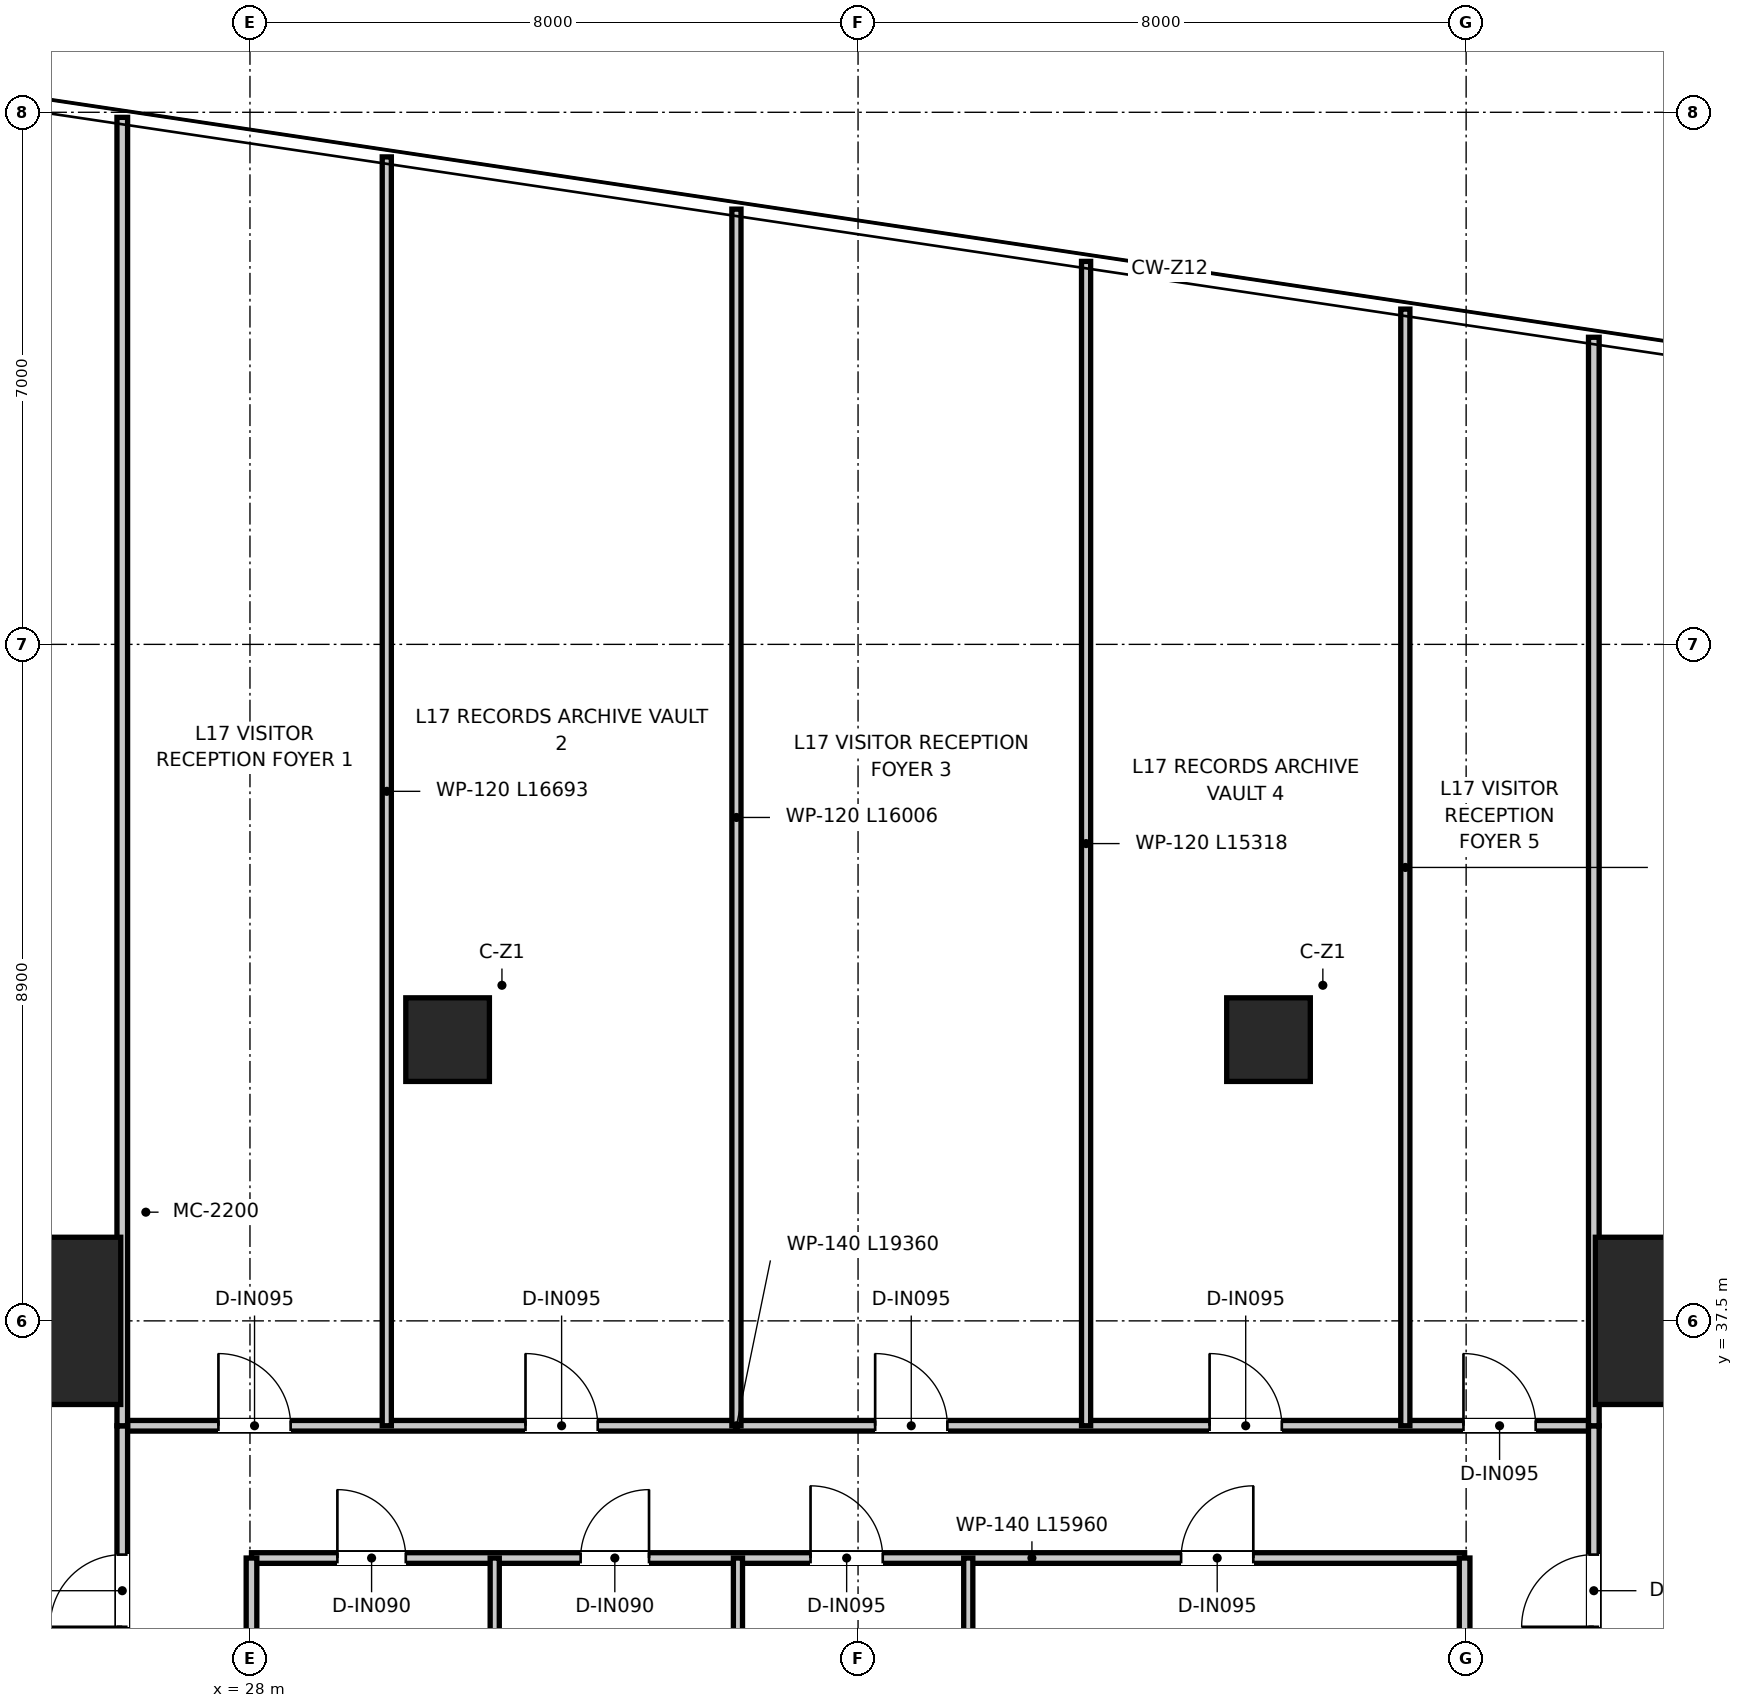
"""IFC4 building model, lengths in metres.
Left out: names, types, materials, properties, quantities, classifications, styles, units other than length and angle.
Written with IfcOpenShell. Run it as: python <this file> out.ifc"""

import sys

from ifc_helpers import new_model, si_unit, direction, frame, frame_2d, origin, origin_2d, place, context, subcontext, project, spatial, rectangle, extrude, source, transform, mapped, element, fill, save


model = new_model("IFC4")
c1 = context("Model", 3, precision=1e-05, world=origin(), true_north=direction((0.0, 1.0)))
c2 = subcontext(c1, "Body", "Model", "MODEL_VIEW")
j1 = project(units=[si_unit("LENGTHUNIT", "METRE"), si_unit("PLANEANGLEUNIT", "RADIAN")], contexts=[c1])
p1 = place(None, origin())
s1 = spatial("IfcSite", under=j1, at=p1, CompositionType="ELEMENT")
p2 = place(p1, origin())
s2 = spatial("IfcBuilding", under=s1, at=p2, CompositionType="ELEMENT")
p3 = place(p2, frame((0.0, 0.0, 72.4)))
s3 = spatial("IfcBuildingStorey", under=s2, at=p3, CompositionType="ELEMENT", Elevation=72.4)
m1 = source(origin(), c2, "Body", "SweptSolid", [
    extrude(rectangle(XDim=2.2, YDim=2.2, at=origin_2d()), origin(), (0.0, 0.0, 1.0), 3.95),
])
for number, where, z_axis, x_axis in (
    (1, (46.8, 37.5, 0.0), (0.0, 0.0, 1.0), (1.0, 0.0, 0.0)),
    (2, (25.2, 37.5, 0.0), (0.0, 0.0, 1.0), (1.0, 0.0, 0.0)),
):
    element("IfcColumn", number, at=place(p3, frame(where, z_axis=z_axis, x_axis=x_axis)), inside=s3, PredefinedType="USERDEFINED", context=c2, shape_type="MappedRepresentation", body=[
        mapped(m1, transform((0.0, 0.0, 0.0), x_axis=(1.0, 0.0, 0.0), y_axis=(0.0, 1.0, 0.0), z_axis=(0.0, 0.0, 1.0), scale=1.0)),
    ])
m2 = source(origin(), c2, "Body", "SweptSolid", [
    extrude(rectangle(XDim=1.1, YDim=1.1, at=origin_2d()), origin(), (0.0, 0.0, 1.0), 3.95),
])
for number, where, z_axis, x_axis in (
    (3, (30.6, 41.2, 0.0), (0.0, 0.0, 1.0), (1.0, 0.0, 0.0)),
    (4, (41.4, 41.2, 0.0), (0.0, 0.0, 1.0), (1.0, 0.0, 0.0)),
):
    element("IfcColumn", number, at=place(p3, frame(where, z_axis=z_axis, x_axis=x_axis)), inside=s3, PredefinedType="COLUMN", context=c2, shape_type="MappedRepresentation", body=[
        mapped(m2, transform((0.0, 0.0, 0.0), x_axis=(1.0, 0.0, 0.0), y_axis=(0.0, 1.0, 0.0), z_axis=(0.0, 0.0, 1.0), scale=1.0)),
    ])
p4 = place(p3, frame((28.02, 34.38, 0.0), z_axis=(0.0, 0.0, 1.0), x_axis=(1.0, 0.0, 0.0)))
e5 = element("IfcWall", 5, at=p4, inside=s3, PredefinedType="PARTITIONING", context=c2, shape_type="SweptSolid", body=[
    extrude(rectangle(XDim=15.96, YDim=0.14, at=frame_2d((7.98, 0.0))), origin(), (0.0, 0.0, 1.0), 3.08),
])
p5 = place(p4, frame((1.13, 0.0, 0.0)))
e6 = element("IfcOpeningElement", 6, at=p5, cuts=e5, PredefinedType="OPENING", context=c2, shape_type="SweptSolid", body=[
    extrude(rectangle(XDim=0.9, YDim=2.1, at=frame_2d((0.45, 1.05))), frame((0.0, 0.08, 0.0), z_axis=(0.0, -1.0, 0.0), x_axis=(1.0, 0.0, 0.0)), (0.0, 0.0, 1.0), 0.16),
])
p6 = place(p4, frame((4.33, 0.0, 0.0)))
e7 = element("IfcOpeningElement", 7, at=p6, cuts=e5, PredefinedType="OPENING", context=c2, shape_type="SweptSolid", body=[
    extrude(rectangle(XDim=0.9, YDim=2.1, at=frame_2d((0.45, 1.05))), frame((0.0, 0.08, 0.0), z_axis=(0.0, -1.0, 0.0), x_axis=(1.0, 0.0, 0.0)), (0.0, 0.0, 1.0), 0.16),
])
p7 = place(p4, frame((7.355, 0.0, 0.0)))
e8 = element("IfcOpeningElement", 8, at=p7, cuts=e5, PredefinedType="OPENING", context=c2, shape_type="SweptSolid", body=[
    extrude(rectangle(XDim=0.95, YDim=2.1, at=frame_2d((0.475, 1.05))), frame((0.0, 0.08, 0.0), z_axis=(0.0, -1.0, 0.0), x_axis=(1.0, 0.0, 0.0)), (0.0, 0.0, 1.0), 0.16),
])
p8 = place(p4, frame((12.23, 0.0, 0.0)))
e9 = element("IfcOpeningElement", 9, at=p8, cuts=e5, PredefinedType="OPENING", context=c2, shape_type="SweptSolid", body=[
    extrude(rectangle(XDim=0.95, YDim=2.1, at=frame_2d((0.475, 1.05))), frame((0.0, 0.08, 0.0), z_axis=(0.0, -1.0, 0.0), x_axis=(1.0, 0.0, 0.0)), (0.0, 0.0, 1.0), 0.16),
])
for number, where, z_axis, x_axis in (
    (10, (28.02, 28.64, 0.0), (0.0, 0.0, 1.0), (0.0, 1.0, 0.0)),
    (11, (43.98, 28.64, 0.0), (0.0, 0.0, 1.0), (0.0, 1.0, 0.0)),
):
    element("IfcWall", number, at=place(p3, frame(where, z_axis=z_axis, x_axis=x_axis)), inside=s3, PredefinedType="PARTITIONING", context=c2, shape_type="SweptSolid", body=[
        extrude(rectangle(XDim=5.74, YDim=0.14, at=frame_2d((2.87, 0.0))), origin(), (0.0, 0.0, 1.0), 3.22),
    ])
for number, where, z_axis, x_axis in (
    (12, (31.22, 30.74, 0.0), (0.0, 0.0, 1.0), (0.0, 1.0, 0.0)),
    (13, (34.42, 30.74, 0.0), (0.0, 0.0, 1.0), (0.0, 1.0, 0.0)),
    (14, (37.45, 30.74, 0.0), (0.0, 0.0, 1.0), (0.0, 1.0, 0.0)),
):
    element("IfcWall", number, at=place(p3, frame(where, z_axis=z_axis, x_axis=x_axis)), inside=s3, PredefinedType="PARTITIONING", context=c2, shape_type="SweptSolid", body=[
        extrude(rectangle(XDim=3.64, YDim=0.12, at=frame_2d((1.82, 0.0))), origin(), (0.0, 0.0, 1.0), 3.12),
    ])
p9 = place(p3, frame((26.32, 36.12, 0.0), z_axis=(0.0, 0.0, 1.0), x_axis=(1.0, 0.0, 0.0)))
e15 = element("IfcWall", 15, at=p9, inside=s3, PredefinedType="PARTITIONING", context=c2, shape_type="SweptSolid", body=[
    extrude(rectangle(XDim=19.36, YDim=0.14, at=frame_2d((9.68, 0.0))), origin(), (0.0, 0.0, 1.0), 3.08),
])
p10 = place(p9, frame((1.265, 0.0, 0.0)))
e16 = element("IfcOpeningElement", 16, at=p10, cuts=e15, PredefinedType="OPENING", context=c2, shape_type="SweptSolid", body=[
    extrude(rectangle(XDim=0.95, YDim=2.1, at=frame_2d((0.475, 1.05))), frame((0.0, 0.08, 0.0), z_axis=(0.0, -1.0, 0.0), x_axis=(1.0, 0.0, 0.0)), (0.0, 0.0, 1.0), 0.16),
])
p11 = place(p9, frame((5.305, 0.0, 0.0)))
e17 = element("IfcOpeningElement", 17, at=p11, cuts=e15, PredefinedType="OPENING", context=c2, shape_type="SweptSolid", body=[
    extrude(rectangle(XDim=0.95, YDim=2.1, at=frame_2d((0.475, 1.05))), frame((0.0, 0.08, 0.0), z_axis=(0.0, -1.0, 0.0), x_axis=(1.0, 0.0, 0.0)), (0.0, 0.0, 1.0), 0.16),
])
p12 = place(p9, frame((9.905, 0.0, 0.0)))
e18 = element("IfcOpeningElement", 18, at=p12, cuts=e15, PredefinedType="OPENING", context=c2, shape_type="SweptSolid", body=[
    extrude(rectangle(XDim=0.95, YDim=2.1, at=frame_2d((0.475, 1.05))), frame((0.0, 0.08, 0.0), z_axis=(0.0, -1.0, 0.0), x_axis=(1.0, 0.0, 0.0)), (0.0, 0.0, 1.0), 0.16),
])
p13 = place(p9, frame((14.305, 0.0, 0.0)))
e19 = element("IfcOpeningElement", 19, at=p13, cuts=e15, PredefinedType="OPENING", context=c2, shape_type="SweptSolid", body=[
    extrude(rectangle(XDim=0.95, YDim=2.1, at=frame_2d((0.475, 1.05))), frame((0.0, 0.08, 0.0), z_axis=(0.0, -1.0, 0.0), x_axis=(1.0, 0.0, 0.0)), (0.0, 0.0, 1.0), 0.16),
])
p14 = place(p9, frame((17.645, 0.0, 0.0)))
e20 = element("IfcOpeningElement", 20, at=p14, cuts=e15, PredefinedType="OPENING", context=c2, shape_type="SweptSolid", body=[
    extrude(rectangle(XDim=0.95, YDim=2.1, at=frame_2d((0.475, 1.05))), frame((0.0, 0.08, 0.0), z_axis=(0.0, -1.0, 0.0), x_axis=(1.0, 0.0, 0.0)), (0.0, 0.0, 1.0), 0.16),
])
p15 = place(p3, frame((26.32, 10.5, 0.0), z_axis=(0.0, 0.0, 1.0), x_axis=(0.0, 1.0, 0.0)))
e21 = element("IfcWall", 21, at=p15, inside=s3, PredefinedType="PARTITIONING", context=c2, shape_type="SweptSolid", body=[
    extrude(rectangle(XDim=25.62, YDim=0.14, at=frame_2d((12.81, 0.0))), origin(), (0.0, 0.0, 1.0), 2.97),
])
p16 = place(p15, frame((7.775, 0.0, 0.0)))
e22 = element("IfcOpeningElement", 22, at=p16, cuts=e21, PredefinedType="OPENING", context=c2, shape_type="SweptSolid", body=[
    extrude(rectangle(XDim=0.95, YDim=2.1, at=frame_2d((0.475, 1.05))), frame((0.0, 0.08, 0.0), z_axis=(0.0, -1.0, 0.0), x_axis=(1.0, 0.0, 0.0)), (0.0, 0.0, 1.0), 0.16),
])
p17 = place(p15, frame((11.275, 0.0, 0.0)))
e23 = element("IfcOpeningElement", 23, at=p17, cuts=e21, PredefinedType="OPENING", context=c2, shape_type="SweptSolid", body=[
    extrude(rectangle(XDim=0.95, YDim=2.1, at=frame_2d((0.475, 1.05))), frame((0.0, 0.08, 0.0), z_axis=(0.0, -1.0, 0.0), x_axis=(1.0, 0.0, 0.0)), (0.0, 0.0, 1.0), 0.16),
])
p18 = place(p15, frame((15.775, 0.0, 0.0)))
e24 = element("IfcOpeningElement", 24, at=p18, cuts=e21, PredefinedType="OPENING", context=c2, shape_type="SweptSolid", body=[
    extrude(rectangle(XDim=0.95, YDim=2.1, at=frame_2d((0.475, 1.05))), frame((0.0, 0.08, 0.0), z_axis=(0.0, -1.0, 0.0), x_axis=(1.0, 0.0, 0.0)), (0.0, 0.0, 1.0), 0.16),
])
p19 = place(p15, frame((20.125, 0.0, 0.0)))
e25 = element("IfcOpeningElement", 25, at=p19, cuts=e21, PredefinedType="OPENING", context=c2, shape_type="SweptSolid", body=[
    extrude(rectangle(XDim=0.95, YDim=2.1, at=frame_2d((0.475, 1.05))), frame((0.0, 0.08, 0.0), z_axis=(0.0, -1.0, 0.0), x_axis=(1.0, 0.0, 0.0)), (0.0, 0.0, 1.0), 0.16),
])
p20 = place(p15, frame((22.975, 0.0, 0.0)))
e26 = element("IfcOpeningElement", 26, at=p20, cuts=e21, PredefinedType="OPENING", context=c2, shape_type="SweptSolid", body=[
    extrude(rectangle(XDim=0.95, YDim=2.1, at=frame_2d((0.475, 1.05))), frame((0.0, 0.08, 0.0), z_axis=(0.0, -1.0, 0.0), x_axis=(1.0, 0.0, 0.0)), (0.0, 0.0, 1.0), 0.16),
])
p21 = place(p3, frame((45.68, 10.5, 0.0), z_axis=(0.0, 0.0, 1.0), x_axis=(0.0, 1.0, 0.0)))
e27 = element("IfcWall", 27, at=p21, inside=s3, PredefinedType="PARTITIONING", context=c2, shape_type="SweptSolid", body=[
    extrude(rectangle(XDim=25.62, YDim=0.14, at=frame_2d((12.81, 0.0))), origin(), (0.0, 0.0, 1.0), 2.97),
])
p22 = place(p21, frame((7.775, 0.0, 0.0)))
e28 = element("IfcOpeningElement", 28, at=p22, cuts=e27, PredefinedType="OPENING", context=c2, shape_type="SweptSolid", body=[
    extrude(rectangle(XDim=0.95, YDim=2.1, at=frame_2d((0.475, 1.05))), frame((0.0, 0.08, 0.0), z_axis=(0.0, -1.0, 0.0), x_axis=(1.0, 0.0, 0.0)), (0.0, 0.0, 1.0), 0.16),
])
p23 = place(p21, frame((11.275, 0.0, 0.0)))
e29 = element("IfcOpeningElement", 29, at=p23, cuts=e27, PredefinedType="OPENING", context=c2, shape_type="SweptSolid", body=[
    extrude(rectangle(XDim=0.95, YDim=2.1, at=frame_2d((0.475, 1.05))), frame((0.0, 0.08, 0.0), z_axis=(0.0, -1.0, 0.0), x_axis=(1.0, 0.0, 0.0)), (0.0, 0.0, 1.0), 0.16),
])
p24 = place(p21, frame((15.775, 0.0, 0.0)))
e30 = element("IfcOpeningElement", 30, at=p24, cuts=e27, PredefinedType="OPENING", context=c2, shape_type="SweptSolid", body=[
    extrude(rectangle(XDim=0.95, YDim=2.1, at=frame_2d((0.475, 1.05))), frame((0.0, 0.08, 0.0), z_axis=(0.0, -1.0, 0.0), x_axis=(1.0, 0.0, 0.0)), (0.0, 0.0, 1.0), 0.16),
])
p25 = place(p21, frame((20.125, 0.0, 0.0)))
e31 = element("IfcOpeningElement", 31, at=p25, cuts=e27, PredefinedType="OPENING", context=c2, shape_type="SweptSolid", body=[
    extrude(rectangle(XDim=0.95, YDim=2.1, at=frame_2d((0.475, 1.05))), frame((0.0, 0.08, 0.0), z_axis=(0.0, -1.0, 0.0), x_axis=(1.0, 0.0, 0.0)), (0.0, 0.0, 1.0), 0.16),
])
p26 = place(p21, frame((22.975, 0.0, 0.0)))
e32 = element("IfcOpeningElement", 32, at=p26, cuts=e27, PredefinedType="OPENING", context=c2, shape_type="SweptSolid", body=[
    extrude(rectangle(XDim=0.95, YDim=2.1, at=frame_2d((0.475, 1.05))), frame((0.0, 0.08, 0.0), z_axis=(0.0, -1.0, 0.0), x_axis=(1.0, 0.0, 0.0)), (0.0, 0.0, 1.0), 0.16),
])
p27 = place(p3, frame((26.32, 36.12, 0.0), z_axis=(0.0, 0.0, 1.0), x_axis=(0.0, 1.0, 0.0)))
e33 = element("IfcWall", 33, at=p27, inside=s3, PredefinedType="PARTITIONING", context=c2, shape_type="SweptSolid", body=[
    extrude(rectangle(XDim=17.213, YDim=0.14, at=frame_2d((8.606, 0.0))), origin(), (0.0, 0.0, 1.0), 2.97),
])
p28 = place(p3, frame((45.68, 36.12, 0.0), z_axis=(0.0, 0.0, 1.0), x_axis=(0.0, 1.0, 0.0)))
e34 = element("IfcWall", 34, at=p28, inside=s3, PredefinedType="PARTITIONING", context=c2, shape_type="SweptSolid", body=[
    extrude(rectangle(XDim=14.32, YDim=0.14, at=frame_2d((7.16, 0.0))), origin(), (0.0, 0.0, 1.0), 2.97),
])
p29 = place(p3, frame((29.8, 36.12, 0.0), z_axis=(0.0, 0.0, 1.0), x_axis=(0.0, 1.0, 0.0)))
e35 = element("IfcWall", 35, at=p29, inside=s3, PredefinedType="PARTITIONING", context=c2, shape_type="SweptSolid", body=[
    extrude(rectangle(XDim=16.693, YDim=0.12, at=frame_2d((8.347, 0.0))), origin(), (0.0, 0.0, 1.0), 2.97),
])
p30 = place(p3, frame((34.4, 36.12, 0.0), z_axis=(0.0, 0.0, 1.0), x_axis=(0.0, 1.0, 0.0)))
e36 = element("IfcWall", 36, at=p30, inside=s3, PredefinedType="PARTITIONING", context=c2, shape_type="SweptSolid", body=[
    extrude(rectangle(XDim=16.006, YDim=0.12, at=frame_2d((8.003, 0.0))), origin(), (0.0, 0.0, 1.0), 2.97),
])
p31 = place(p3, frame((39.0, 36.12, 0.0), z_axis=(0.0, 0.0, 1.0), x_axis=(0.0, 1.0, 0.0)))
e37 = element("IfcWall", 37, at=p31, inside=s3, PredefinedType="PARTITIONING", context=c2, shape_type="SweptSolid", body=[
    extrude(rectangle(XDim=15.318, YDim=0.12, at=frame_2d((7.659, 0.0))), origin(), (0.0, 0.0, 1.0), 2.97),
])
p32 = place(p3, frame((43.2, 36.12, 0.0), z_axis=(0.0, 0.0, 1.0), x_axis=(0.0, 1.0, 0.0)))
e38 = element("IfcWall", 38, at=p32, inside=s3, PredefinedType="PARTITIONING", context=c2, shape_type="SweptSolid", body=[
    extrude(rectangle(XDim=14.69, YDim=0.12, at=frame_2d((7.345, 0.0))), origin(), (0.0, 0.0, 1.0), 2.97),
])
p33 = place(p5, origin())
e39 = element("IfcDoor", 39, at=p33, inside=s3, OperationType="SINGLE_SWING_LEFT", PredefinedType="DOOR", context=c2, shape_type="SweptSolid", body=[
    extrude(rectangle(XDim=0.9, YDim=2.1, at=frame_2d((0.45, 1.05))), frame((0.0, 0.025, 0.0), z_axis=(0.0, -1.0, 0.0), x_axis=(1.0, 0.0, 0.0)), (0.0, 0.0, 1.0), 0.05),
])
fill(e6, e39)
p34 = place(p6, origin())
e40 = element("IfcDoor", 40, at=p34, inside=s3, OperationType="SINGLE_SWING_RIGHT", PredefinedType="DOOR", context=c2, shape_type="SweptSolid", body=[
    extrude(rectangle(XDim=0.9, YDim=2.1, at=frame_2d((0.45, 1.05))), frame((0.0, 0.025, 0.0), z_axis=(0.0, -1.0, 0.0), x_axis=(1.0, 0.0, 0.0)), (0.0, 0.0, 1.0), 0.05),
])
fill(e7, e40)
p35 = place(p7, origin())
e41 = element("IfcDoor", 41, at=p35, inside=s3, OperationType="SINGLE_SWING_LEFT", PredefinedType="DOOR", context=c2, shape_type="SweptSolid", body=[
    extrude(rectangle(XDim=0.95, YDim=2.1, at=frame_2d((0.475, 1.05))), frame((0.0, 0.025, 0.0), z_axis=(0.0, -1.0, 0.0), x_axis=(1.0, 0.0, 0.0)), (0.0, 0.0, 1.0), 0.05),
])
fill(e8, e41)
p36 = place(p8, origin())
e42 = element("IfcDoor", 42, at=p36, inside=s3, OperationType="SINGLE_SWING_RIGHT", PredefinedType="DOOR", context=c2, shape_type="SweptSolid", body=[
    extrude(rectangle(XDim=0.95, YDim=2.1, at=frame_2d((0.475, 1.05))), frame((0.0, 0.025, 0.0), z_axis=(0.0, -1.0, 0.0), x_axis=(1.0, 0.0, 0.0)), (0.0, 0.0, 1.0), 0.05),
])
fill(e9, e42)
p37 = place(p10, origin())
e43 = element("IfcDoor", 43, at=p37, inside=s3, OperationType="SINGLE_SWING_LEFT", PredefinedType="DOOR", context=c2, shape_type="SweptSolid", body=[
    extrude(rectangle(XDim=0.95, YDim=2.1, at=frame_2d((0.475, 1.05))), frame((0.0, 0.025, 0.0), z_axis=(0.0, -1.0, 0.0), x_axis=(1.0, 0.0, 0.0)), (0.0, 0.0, 1.0), 0.05),
])
fill(e16, e43)
p38 = place(p11, origin())
e44 = element("IfcDoor", 44, at=p38, inside=s3, OperationType="SINGLE_SWING_LEFT", PredefinedType="DOOR", context=c2, shape_type="SweptSolid", body=[
    extrude(rectangle(XDim=0.95, YDim=2.1, at=frame_2d((0.475, 1.05))), frame((0.0, 0.025, 0.0), z_axis=(0.0, -1.0, 0.0), x_axis=(1.0, 0.0, 0.0)), (0.0, 0.0, 1.0), 0.05),
])
fill(e17, e44)
p39 = place(p12, origin())
e45 = element("IfcDoor", 45, at=p39, inside=s3, OperationType="SINGLE_SWING_LEFT", PredefinedType="DOOR", context=c2, shape_type="SweptSolid", body=[
    extrude(rectangle(XDim=0.95, YDim=2.1, at=frame_2d((0.475, 1.05))), frame((0.0, 0.025, 0.0), z_axis=(0.0, -1.0, 0.0), x_axis=(1.0, 0.0, 0.0)), (0.0, 0.0, 1.0), 0.05),
])
fill(e18, e45)
p40 = place(p13, origin())
e46 = element("IfcDoor", 46, at=p40, inside=s3, OperationType="SINGLE_SWING_LEFT", PredefinedType="DOOR", context=c2, shape_type="SweptSolid", body=[
    extrude(rectangle(XDim=0.95, YDim=2.1, at=frame_2d((0.475, 1.05))), frame((0.0, 0.025, 0.0), z_axis=(0.0, -1.0, 0.0), x_axis=(1.0, 0.0, 0.0)), (0.0, 0.0, 1.0), 0.05),
])
fill(e19, e46)
p41 = place(p14, origin())
e47 = element("IfcDoor", 47, at=p41, inside=s3, OperationType="SINGLE_SWING_LEFT", PredefinedType="DOOR", context=c2, shape_type="SweptSolid", body=[
    extrude(rectangle(XDim=0.95, YDim=2.1, at=frame_2d((0.475, 1.05))), frame((0.0, 0.025, 0.0), z_axis=(0.0, -1.0, 0.0), x_axis=(1.0, 0.0, 0.0)), (0.0, 0.0, 1.0), 0.05),
])
fill(e20, e47)
p42 = place(p20, origin())
e48 = element("IfcDoor", 48, at=p42, inside=s3, OperationType="SINGLE_SWING_LEFT", PredefinedType="DOOR", context=c2, shape_type="SweptSolid", body=[
    extrude(rectangle(XDim=0.95, YDim=2.1, at=frame_2d((0.475, 1.05))), frame((0.0, 0.025, 0.0), z_axis=(0.0, -1.0, 0.0), x_axis=(1.0, 0.0, 0.0)), (0.0, 0.0, 1.0), 0.05),
])
fill(e26, e48)
p43 = place(p26, origin())
e49 = element("IfcDoor", 49, at=p43, inside=s3, OperationType="SINGLE_SWING_LEFT", PredefinedType="DOOR", context=c2, shape_type="SweptSolid", body=[
    extrude(rectangle(XDim=0.95, YDim=2.1, at=frame_2d((0.475, 1.05))), frame((0.0, 0.025, 0.0), z_axis=(0.0, -1.0, 0.0), x_axis=(1.0, 0.0, 0.0)), (0.0, 0.0, 1.0), 0.05),
])
fill(e32, e49)
save(model, sys.argv[1])
